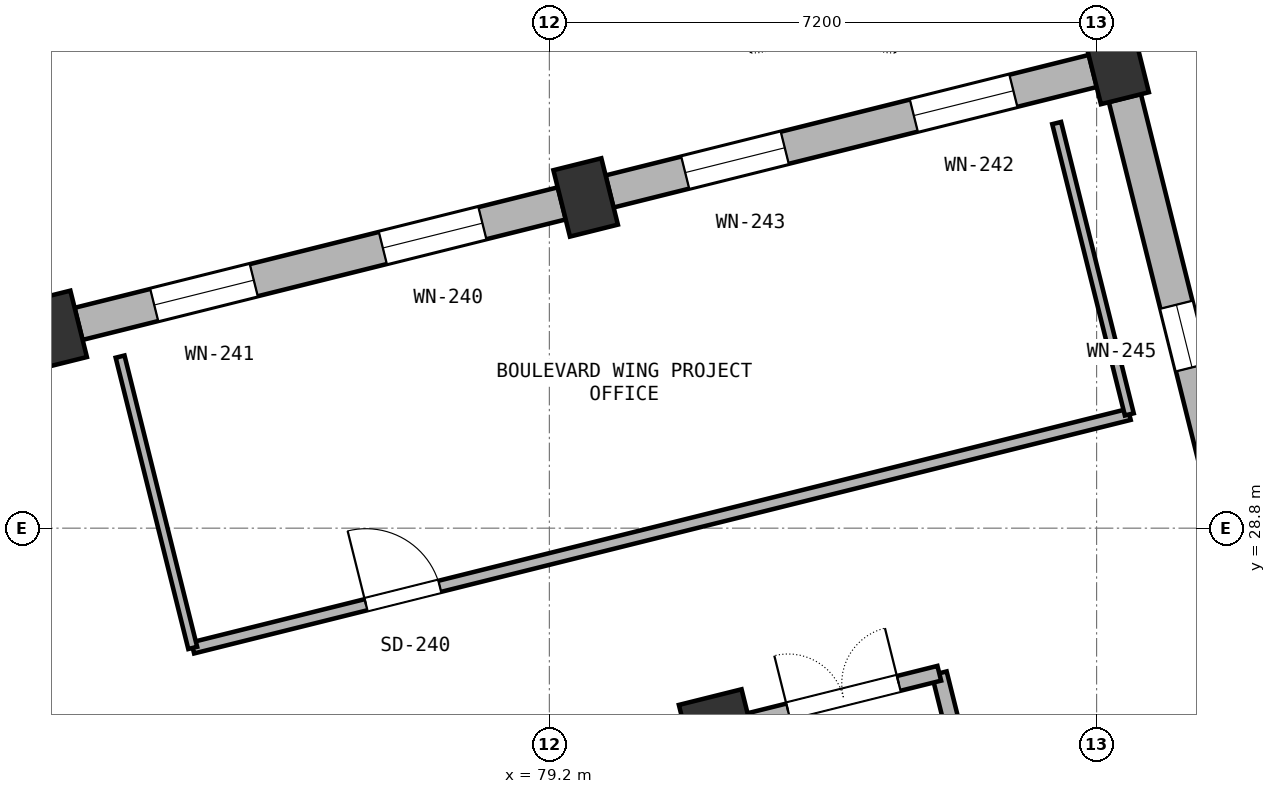
"""IFC4 building model, lengths in metres.
Left out: names, types, materials, properties, quantities, classifications, styles, units other than length and angle.
Written with IfcOpenShell. Run it as: python <this file> out.ifc"""

import sys

from ifc_helpers import new_model, si_unit, direction, frame, frame_2d, origin, origin_2d, place, context, subcontext, project, spatial, rectangle, extrude, element, fill, save


model = new_model("IFC4")
c1 = context("Model", 3, precision=1e-05, world=origin(), true_north=direction((0.0, 1.0)))
c2 = subcontext(c1, "Body", "Model", "MODEL_VIEW")
j1 = project(units=[si_unit("LENGTHUNIT", "METRE"), si_unit("PLANEANGLEUNIT", "RADIAN")], contexts=[c1])
p1 = place(None, origin())
s1 = spatial("IfcSite", under=j1, at=p1, CompositionType="ELEMENT")
p2 = place(p1, origin())
s2 = spatial("IfcBuilding", under=s1, at=p2, CompositionType="ELEMENT")
p3 = place(p2, origin())
s3 = spatial("IfcBuildingStorey", under=s2, at=p3, CompositionType="ELEMENT", Elevation=0.0)
p4 = place(p3, frame((72.691, 31.409, 0.0), z_axis=(0.0, 0.0, 1.0), x_axis=(0.970295726276, 0.2419218956, 0.0)))
e1 = element("IfcColumn", 1, at=p4, inside=s3, PredefinedType="COLUMN", context=c2, shape_type="SweptSolid", body=[
    extrude(rectangle(XDim=0.65, YDim=0.9, at=origin_2d()), origin(), (0.0, 0.0, 1.0), 5.4),
])
p5 = place(p3, frame((81.419, 26.165, 0.0), z_axis=(0.0, 0.0, 1.0), x_axis=(0.970295726276, 0.2419218956, 0.0)))
e2 = element("IfcColumn", 2, at=p5, inside=s3, PredefinedType="COLUMN", context=c2, shape_type="SweptSolid", body=[
    extrude(rectangle(XDim=0.85, YDim=0.85, at=origin_2d()), origin(), (0.0, 0.0, 1.0), 5.4),
])
for number, where, z_axis, x_axis in (
    (3, (79.677, 33.151, 0.0), (0.0, 0.0, 1.0), (0.97, 0.242, 0.0)),
    (4, (86.664, 34.893, 0.0), (0.0, 0.0, 1.0), (0.97, 0.242, 0.0)),
):
    element("IfcColumn", number, at=place(p3, frame(where, z_axis=z_axis, x_axis=x_axis)), inside=s3, PredefinedType="COLUMN", context=c2, shape_type="SweptSolid", body=[
        extrude(rectangle(XDim=0.65, YDim=0.9, at=origin_2d()), origin(), (0.0, 0.0, 1.0), 5.4),
    ])
p6 = place(p3, frame((79.364, 33.073, 0.0), z_axis=(0.0, 0.0, 1.0), x_axis=(-0.970300061562, -0.241904507055, 0.0)))
e5 = element("IfcWall", 5, at=p6, inside=s3, PredefinedType="SOLIDWALL", context=c2, shape_type="SweptSolid", body=[
    extrude(rectangle(XDim=6.554, YDim=0.435, at=frame_2d((3.277, 0.0))), origin(), (0.0, 0.0, 1.0), 4.1),
])
p7 = place(p6, frame((1.077, 0.0, 0.65)))
e6 = element("IfcOpeningElement", 6, at=p7, cuts=e5, PredefinedType="OPENING", context=c2, shape_type="SweptSolid", body=[
    extrude(rectangle(XDim=1.35, YDim=2.4, at=frame_2d((0.675, 1.2))), frame((0.0, 0.228, 0.0), z_axis=(0.0, -1.0, 0.0), x_axis=(1.0, 0.0, 0.0)), (0.0, 0.0, 1.0), 0.455),
])
p8 = place(p6, frame((4.177, 0.0, 0.65)))
e7 = element("IfcOpeningElement", 7, at=p8, cuts=e5, PredefinedType="OPENING", context=c2, shape_type="SweptSolid", body=[
    extrude(rectangle(XDim=1.35, YDim=2.4, at=frame_2d((0.675, 1.2))), frame((0.0, 0.228, 0.0), z_axis=(0.0, -1.0, 0.0), x_axis=(1.0, 0.0, 0.0)), (0.0, 0.0, 1.0), 0.455),
])
p9 = place(p3, frame((86.35, 34.815, 0.0), z_axis=(0.0, 0.0, 1.0), x_axis=(-0.970300061562, -0.241904507055, 0.0)))
e8 = element("IfcWall", 8, at=p9, inside=s3, PredefinedType="SOLIDWALL", context=c2, shape_type="SweptSolid", body=[
    extrude(rectangle(XDim=6.554, YDim=0.435, at=frame_2d((3.277, 0.0))), origin(), (0.0, 0.0, 1.0), 4.1),
])
p10 = place(p9, frame((1.077, 0.0, 0.65)))
e9 = element("IfcOpeningElement", 9, at=p10, cuts=e8, PredefinedType="OPENING", context=c2, shape_type="SweptSolid", body=[
    extrude(rectangle(XDim=1.35, YDim=2.4, at=frame_2d((0.675, 1.2))), frame((0.0, 0.228, 0.0), z_axis=(0.0, -1.0, 0.0), x_axis=(1.0, 0.0, 0.0)), (0.0, 0.0, 1.0), 0.455),
])
p11 = place(p9, frame((4.177, 0.0, 0.65)))
e10 = element("IfcOpeningElement", 10, at=p11, cuts=e8, PredefinedType="OPENING", context=c2, shape_type="SweptSolid", body=[
    extrude(rectangle(XDim=1.35, YDim=2.4, at=frame_2d((0.675, 1.2))), frame((0.0, 0.228, 0.0), z_axis=(0.0, -1.0, 0.0), x_axis=(1.0, 0.0, 0.0)), (0.0, 0.0, 1.0), 0.455),
])
p12 = place(p3, frame((88.297, 28.342, 0.0), z_axis=(0.0, 0.0, 1.0), x_axis=(-0.241888603038, 0.970304026437, 0.0)))
e11 = element("IfcWall", 11, at=p12, inside=s3, PredefinedType="SOLIDWALL", context=c2, shape_type="SweptSolid", body=[
    extrude(rectangle(XDim=6.304, YDim=0.435, at=frame_2d((3.152, 0.0))), origin(), (0.0, 0.0, 1.0), 4.1),
])
p13 = place(p12, frame((2.652, 0.0, 0.7)))
e12 = element("IfcOpeningElement", 12, at=p13, cuts=e11, PredefinedType="OPENING", context=c2, shape_type="SweptSolid", body=[
    extrude(rectangle(XDim=0.85, YDim=2.2, at=frame_2d((0.425, 1.1))), frame((0.0, 0.228, 0.0), z_axis=(0.0, -1.0, 0.0), x_axis=(1.0, 0.0, 0.0)), (0.0, 0.0, 1.0), 0.455),
])
p14 = place(p3, frame((86.072, 19.905, 0.0), z_axis=(0.0, 0.0, 1.0), x_axis=(-0.241937193493, 0.970291911955, 0.0)))
e13 = element("IfcWall", 13, at=p14, inside=s3, PredefinedType="PARTITIONING", context=c2, shape_type="SweptSolid", body=[
    extrude(rectangle(XDim=7.2, YDim=0.2, at=frame_2d((3.6, 0.0))), origin(), (0.0, 0.0, 1.0), 4.12),
])
p15 = place(p3, frame((84.33, 26.891, 0.0), z_axis=(0.0, 0.0, 1.0), x_axis=(-0.970309259708, -0.2418676095, 0.0)))
e14 = element("IfcWall", 14, at=p15, inside=s3, PredefinedType="PARTITIONING", context=c2, shape_type="SweptSolid", body=[
    extrude(rectangle(XDim=2.58, YDim=0.2, at=frame_2d((1.29, 0.0))), origin(), (0.0, 0.0, 1.0), 4.12),
])
p16 = place(p15, frame((0.55, 0.0, 0.0)))
e15 = element("IfcOpeningElement", 15, at=p16, cuts=e14, PredefinedType="OPENING", context=c2, shape_type="SweptSolid", body=[
    extrude(rectangle(XDim=1.5, YDim=2.2, at=frame_2d((0.75, 1.1))), frame((0.0, 0.11, 0.0), z_axis=(0.0, -1.0, 0.0), x_axis=(1.0, 0.0, 0.0)), (0.0, 0.0, 1.0), 0.22),
])
p17 = place(p3, frame((74.508, 27.225, 0.0), z_axis=(0.0, 0.0, 1.0), x_axis=(0.970298350757, 0.241911369139, 0.0)))
e16 = element("IfcWall", 16, at=p17, inside=s3, PredefinedType="PARTITIONING", context=c2, shape_type="SweptSolid", body=[
    extrude(rectangle(XDim=12.7, YDim=0.15, at=frame_2d((6.35, 0.0))), origin(), (0.0, 0.0, 1.0), 4.12),
])
p18 = place(p17, frame((2.35, 0.0, 0.0)))
e17 = element("IfcOpeningElement", 17, at=p18, cuts=e16, PredefinedType="OPENING", context=c2, shape_type="SweptSolid", body=[
    extrude(rectangle(XDim=1.0, YDim=2.15, at=frame_2d((0.5, 1.075))), frame((0.0, 0.085, 0.0), z_axis=(0.0, -1.0, 0.0), x_axis=(1.0, 0.0, 0.0)), (0.0, 0.0, 1.0), 0.17),
])
p19 = place(p3, frame((74.508, 27.225, 0.0), z_axis=(0.0, 0.0, 1.0), x_axis=(-0.241924747697, 0.970295015164, 0.0)))
e18 = element("IfcWall", 18, at=p19, inside=s3, PredefinedType="PARTITIONING", context=c2, shape_type="SweptSolid", body=[
    extrude(rectangle(XDim=3.95, YDim=0.12, at=frame_2d((1.975, 0.0))), origin(), (0.0, 0.0, 1.0), 4.12),
])
p20 = place(p3, frame((85.875, 34.13, 0.0), z_axis=(0.0, 0.0, 1.0), x_axis=(0.241910239337, -0.970298632434, 0.0)))
e19 = element("IfcWall", 19, at=p20, inside=s3, PredefinedType="PARTITIONING", context=c2, shape_type="SweptSolid", body=[
    extrude(rectangle(XDim=3.95, YDim=0.12, at=frame_2d((1.975, 0.0))), origin(), (0.0, 0.0, 1.0), 4.12),
])
p21 = place(p7, origin())
e20 = element("IfcWindow", 20, at=p21, inside=s3, PartitioningType="DOUBLE_PANEL_VERTICAL", PredefinedType="WINDOW", context=c2, shape_type="SweptSolid", body=[
    extrude(rectangle(XDim=1.35, YDim=2.4, at=frame_2d((0.675, 1.2))), frame((0.0, 0.03, 0.0), z_axis=(0.0, -1.0, 0.0), x_axis=(1.0, 0.0, 0.0)), (0.0, 0.0, 1.0), 0.06),
])
fill(e6, e20)
p22 = place(p8, origin())
e21 = element("IfcWindow", 21, at=p22, inside=s3, PartitioningType="DOUBLE_PANEL_VERTICAL", PredefinedType="WINDOW", context=c2, shape_type="SweptSolid", body=[
    extrude(rectangle(XDim=1.35, YDim=2.4, at=frame_2d((0.675, 1.2))), frame((0.0, 0.03, 0.0), z_axis=(0.0, -1.0, 0.0), x_axis=(1.0, 0.0, 0.0)), (0.0, 0.0, 1.0), 0.06),
])
fill(e7, e21)
p23 = place(p10, origin())
e22 = element("IfcWindow", 22, at=p23, inside=s3, PartitioningType="DOUBLE_PANEL_VERTICAL", PredefinedType="WINDOW", context=c2, shape_type="SweptSolid", body=[
    extrude(rectangle(XDim=1.35, YDim=2.4, at=frame_2d((0.675, 1.2))), frame((0.0, 0.03, 0.0), z_axis=(0.0, -1.0, 0.0), x_axis=(1.0, 0.0, 0.0)), (0.0, 0.0, 1.0), 0.06),
])
fill(e9, e22)
p24 = place(p11, origin())
e23 = element("IfcWindow", 23, at=p24, inside=s3, PartitioningType="DOUBLE_PANEL_VERTICAL", PredefinedType="WINDOW", context=c2, shape_type="SweptSolid", body=[
    extrude(rectangle(XDim=1.35, YDim=2.4, at=frame_2d((0.675, 1.2))), frame((0.0, 0.03, 0.0), z_axis=(0.0, -1.0, 0.0), x_axis=(1.0, 0.0, 0.0)), (0.0, 0.0, 1.0), 0.06),
])
fill(e10, e23)
p25 = place(p13, origin())
e24 = element("IfcWindow", 24, at=p25, inside=s3, PartitioningType="SINGLE_PANEL", PredefinedType="WINDOW", context=c2, shape_type="SweptSolid", body=[
    extrude(rectangle(XDim=0.85, YDim=2.2, at=frame_2d((0.425, 1.1))), frame((0.0, 0.03, 0.0), z_axis=(0.0, -1.0, 0.0), x_axis=(1.0, 0.0, 0.0)), (0.0, 0.0, 1.0), 0.06),
])
fill(e12, e24)
p26 = place(p16, frame((1.5, 0.0, 0.0), z_axis=(0.0, 0.0, 1.0), x_axis=(-1.0, 0.0, 0.0)))
e25 = element("IfcDoor", 25, at=p26, inside=s3, OperationType="DOUBLE_DOOR_SINGLE_SWING", PredefinedType="DOOR", context=c2, shape_type="SweptSolid", body=[
    extrude(rectangle(XDim=1.5, YDim=2.2, at=frame_2d((0.75, 1.1))), frame((0.0, 0.025, 0.0), z_axis=(0.0, -1.0, 0.0), x_axis=(1.0, 0.0, 0.0)), (0.0, 0.0, 1.0), 0.05),
])
fill(e15, e25)
p27 = place(p18, origin())
e26 = element("IfcDoor", 26, at=p27, inside=s3, OperationType="SINGLE_SWING_LEFT", PredefinedType="DOOR", context=c2, shape_type="SweptSolid", body=[
    extrude(rectangle(XDim=1.0, YDim=2.15, at=frame_2d((0.5, 1.075))), frame((0.0, 0.025, 0.0), z_axis=(0.0, -1.0, 0.0), x_axis=(1.0, 0.0, 0.0)), (0.0, 0.0, 1.0), 0.05),
])
fill(e17, e26)
save(model, sys.argv[1])
